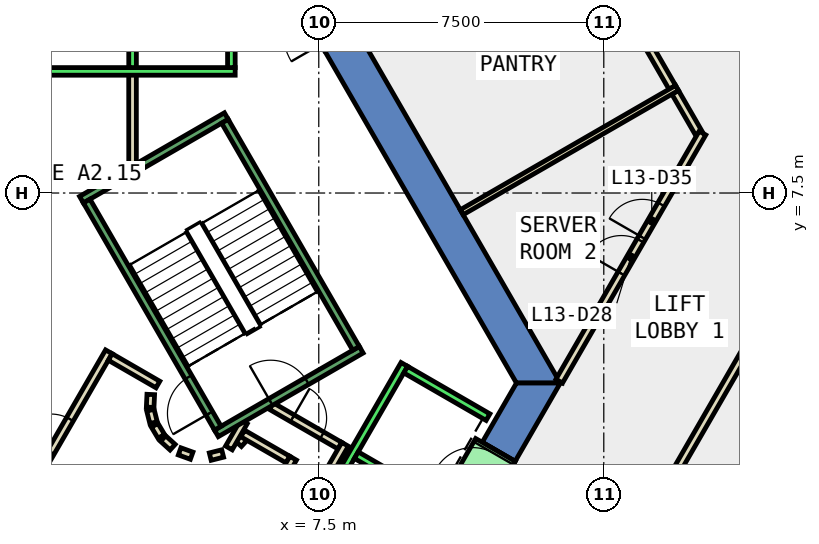
"""IFC4 building model, lengths in metres.
Left out: names, types, materials, properties, quantities, classifications, styles, units other than length and angle.
Written with IfcOpenShell. Run it as: python <this file> out.ifc"""

import sys

from ifc_helpers import new_model, si_unit, direction, frame, frame_2d, origin, place, context, subcontext, project, spatial, polyline, rectangle, outline, extrude, element, fill, save


model = new_model("IFC4")
c1 = context("Model", 3, precision=1e-05, world=origin(), true_north=direction((0.0, 1.0)))
c2 = subcontext(c1, "Body", "Model", "MODEL_VIEW")
j1 = project(units=[si_unit("LENGTHUNIT", "METRE"), si_unit("PLANEANGLEUNIT", "RADIAN")], contexts=[c1])
p1 = place(None, origin())
s1 = spatial("IfcSite", under=j1, at=p1, CompositionType="ELEMENT")
p2 = place(p1, origin())
s2 = spatial("IfcBuilding", under=s1, at=p2, CompositionType="ELEMENT")
p3 = place(p2, frame((0.0, 0.0, 64.4)))
s3 = spatial("IfcBuildingStorey", under=s2, at=p3, CompositionType="ELEMENT", Elevation=64.4)
p4 = place(p3, frame((0.0, 0.0, -0.4)))
e1 = element("IfcWall", 1, at=p4, inside=s3, PredefinedType="SHEAR", context=c2, shape_type="SweptSolid", body=[
    extrude(outline(polyline([(8.517, 11.748), (7.651, 11.248), (12.702, 2.5), (13.856, 2.5), (8.517, 11.748)])), origin(), (0.0, 0.0, 1.0), 4.2),
])
p5 = place(p3, frame((0.0, 0.0, -0.4)))
e2 = element("IfcWall", 2, at=p5, inside=s3, PredefinedType="SHEAR", context=c2, shape_type="SweptSolid", body=[
    extrude(outline(polyline([(11.801, 0.94), (12.667, 0.44), (13.856, 2.5), (12.702, 2.5), (11.801, 0.94)])), origin(), (0.0, 0.0, 1.0), 4.2),
])
p6 = place(p3, frame((0.0, 0.0, 3.6)))
e3 = element("IfcWall", 3, at=p6, inside=s3, PredefinedType="SHEAR", context=c2, shape_type="SweptSolid", body=[
    extrude(outline(polyline([(12.667, 0.44), (11.801, 0.94), (11.151, -0.186), (12.017, -0.686), (12.667, 0.44)])), origin(), (0.0, 0.0, 1.0), 0.2),
])
p7 = place(p3, frame((17.497, 9.078, 0.0), z_axis=(0.0, 0.0, 1.0), x_axis=(-0.500126451326, 0.865952384768, 0.0)))
e4 = element("IfcWall", 4, at=p7, inside=s3, PredefinedType="PARTITIONING", context=c2, shape_type="SweptSolid", body=[
    extrude(rectangle(XDim=1.238, YDim=0.2, at=frame_2d((0.619, 0.0))), origin(), (0.0, 0.0, 1.0), 3.8),
])
p8 = place(p3, frame((16.803, 10.28, 0.0), z_axis=(0.0, 0.0, 1.0), x_axis=(-0.499941881293, 0.866058956036, 0.0)))
e5 = element("IfcWall", 5, at=p8, inside=s3, PredefinedType="PARTITIONING", context=c2, shape_type="SweptSolid", body=[
    extrude(rectangle(XDim=3.114, YDim=0.2, at=frame_2d((1.557, 0.0))), origin(), (0.0, 0.0, 1.0), 3.8),
])
p9 = place(p3, frame((17.318, 14.187, 0.0), z_axis=(0.0, 0.0, 1.0), x_axis=(0.499986381413, -0.866033266336, 0.0)))
e6 = element("IfcWall", 6, at=p9, inside=s3, PredefinedType="PARTITIONING", context=c2, shape_type="SweptSolid", body=[
    extrude(rectangle(XDim=7.18, YDim=0.2, at=frame_2d((3.59, 0.0))), origin(), (0.0, 0.0, 1.0), 3.8),
])
p10 = place(p9, frame((3.165, 0.0, 0.0)))
e7 = element("IfcOpeningElement", 7, at=p10, cuts=e6, PredefinedType="OPENING", context=c2, shape_type="SweptSolid", body=[
    extrude(rectangle(XDim=1.0, YDim=2.1, at=frame_2d((0.5, 1.05))), frame((0.0, 0.11, 0.0), z_axis=(0.0, -1.0, 0.0), x_axis=(1.0, 0.0, 0.0)), (0.0, 0.0, 1.0), 0.22),
])
p11 = place(p3, frame((1.88, 7.8, 0.0), z_axis=(0.0, 0.0, 1.0), x_axis=(-1.0, 0.0, 0.0)))
e8 = element("IfcWall", 8, at=p11, inside=s3, PredefinedType="PARTITIONING", context=c2, shape_type="SweptSolid", body=[
    extrude(rectangle(XDim=1.78, YDim=0.2, at=frame_2d((0.89, 0.0))), origin(), (0.0, 0.0, 1.0), 3.8),
])
p12 = place(p3, frame((2.599, 10.7, 0.0), z_axis=(0.0, 0.0, 1.0), x_axis=(0.000393159002, -0.999999922713, 0.0)))
e9 = element("IfcWall", 9, at=p12, inside=s3, PredefinedType="PARTITIONING", context=c2, shape_type="SweptSolid", body=[
    extrude(rectangle(XDim=2.484, YDim=0.2, at=frame_2d((1.242, 0.0))), origin(), (0.0, 0.0, 1.0), 3.8),
])
p13 = place(p3, frame((5.39, 0.898, 0.0), z_axis=(0.0, 0.0, 1.0), x_axis=(0.673828488714, 0.738887791073, 0.0)))
e10 = element("IfcWall", 10, at=p13, inside=s3, PredefinedType="PARTITIONING", context=c2, shape_type="SweptSolid", body=[
    extrude(rectangle(XDim=0.263, YDim=0.2, at=frame_2d((0.131, 0.0))), origin(), (0.0, 0.0, 1.0), 3.8),
])
p14 = place(p3, frame((5.499, 1.172, 0.0), z_axis=(0.0, 0.0, 1.0), x_axis=(0.866333505267, -0.499465972466, 0.0)))
e11 = element("IfcWall", 11, at=p14, inside=s3, PredefinedType="PARTITIONING", context=c2, shape_type="SweptSolid", body=[
    extrude(rectangle(XDim=1.374, YDim=0.2, at=frame_2d((0.687, 0.0))), origin(), (0.0, 0.0, 1.0), 3.8),
])
p15 = place(p3, frame((6.826, 0.522, 0.0), z_axis=(0.0, 0.0, 1.0), x_axis=(-0.500016722714, -0.866015748706, 0.0)))
e12 = element("IfcWall", 12, at=p15, inside=s3, PredefinedType="PARTITIONING", context=c2, shape_type="SweptSolid", body=[
    extrude(rectangle(XDim=1.7, YDim=0.2, at=frame_2d((0.85, 0.0))), origin(), (0.0, 0.0, 1.0), 3.8),
])
p16 = place(p3, frame((6.25, 1.894, 0.0), z_axis=(0.0, 0.0, 1.0), x_axis=(0.866043184279, -0.499969202016, 0.0)))
e13 = element("IfcWall", 13, at=p16, inside=s3, PredefinedType="PARTITIONING", context=c2, shape_type="SweptSolid", body=[
    extrude(rectangle(XDim=2.084, YDim=0.2, at=frame_2d((1.042, 0.0))), origin(), (0.0, 0.0, 1.0), 3.8),
])
p17 = place(p16, frame((0.642, 0.0, 0.0)))
e14 = element("IfcOpeningElement", 14, at=p17, cuts=e13, PredefinedType="OPENING", context=c2, shape_type="SweptSolid", body=[
    extrude(rectangle(XDim=0.9, YDim=2.1, at=frame_2d((0.45, 1.05))), frame((0.0, 0.11, 0.0), z_axis=(0.0, -1.0, 0.0), x_axis=(1.0, 0.0, 0.0)), (0.0, 0.0, 1.0), 0.22),
])
p18 = place(p3, frame((8.192, 0.888, 0.0), z_axis=(0.0, 0.0, 1.0), x_axis=(-0.499940625693, -0.866059680843, 0.0)))
e15 = element("IfcWall", 15, at=p18, inside=s3, PredefinedType="PARTITIONING", context=c2, shape_type="SweptSolid", body=[
    extrude(rectangle(XDim=2.68, YDim=0.2, at=frame_2d((1.34, 0.0))), origin(), (0.0, 0.0, 1.0), 3.8),
])
p19 = place(p3, frame((5.135, 0.793, 0.0), z_axis=(0.0, 0.0, 1.0), x_axis=(0.499526442893, 0.866298639529, 0.0)))
e16 = element("IfcWall", 16, at=p19, inside=s3, PredefinedType="PARTITIONING", context=c2, shape_type="SweptSolid", body=[
    extrude(rectangle(XDim=0.791, YDim=0.2, at=frame_2d((0.396, 0.0))), origin(), (0.0, 0.0, 1.0), 3.8),
])
p20 = place(p3, frame((11.261, 6.994, 0.0), z_axis=(0.0, 0.0, 1.0), x_axis=(0.866043905515, 0.499967952693, 0.0)))
e17 = element("IfcWall", 17, at=p20, inside=s3, PredefinedType="PARTITIONING", context=c2, shape_type="SweptSolid", body=[
    extrude(rectangle(XDim=6.542, YDim=0.15, at=frame_2d((3.271, 0.0))), origin(), (0.0, 0.0, 1.0), 3.8),
])
p21 = place(p3, frame((13.827, 2.55, 0.0), z_axis=(0.0, 0.0, 1.0), x_axis=(0.500116794417, 0.865957961995, 0.0)))
e18 = element("IfcWall", 18, at=p21, inside=s3, PredefinedType="PARTITIONING", context=c2, shape_type="SweptSolid", body=[
    extrude(rectangle(XDim=7.538, YDim=0.2, at=frame_2d((3.769, 0.0))), origin(), (0.0, 0.0, 1.0), 3.8),
])
p22 = place(p21, frame((3.269, 0.0, 0.0)))
e19 = element("IfcOpeningElement", 19, at=p22, cuts=e18, PredefinedType="OPENING", context=c2, shape_type="SweptSolid", body=[
    extrude(rectangle(XDim=1.0, YDim=2.1, at=frame_2d((0.5, 1.05))), frame((0.0, 0.11, 0.0), z_axis=(0.0, -1.0, 0.0), x_axis=(1.0, 0.0, 0.0)), (0.0, 0.0, 1.0), 0.22),
])
p23 = place(p21, frame((4.369, 0.0, 0.0)))
e20 = element("IfcOpeningElement", 20, at=p23, cuts=e18, PredefinedType="OPENING", context=c2, shape_type="SweptSolid", body=[
    extrude(rectangle(XDim=1.0, YDim=2.1, at=frame_2d((0.5, 1.05))), frame((0.0, 0.11, 0.0), z_axis=(0.0, -1.0, 0.0), x_axis=(1.0, 0.0, 0.0)), (0.0, 0.0, 1.0), 0.22),
])
p24 = place(p3, frame((-0.52, -1.0, 0.0), z_axis=(0.0, 0.0, 1.0), x_axis=(0.50011622646, 0.865958290007, 0.0)))
e21 = element("IfcWall", 21, at=p24, inside=s3, PredefinedType="PARTITIONING", context=c2, shape_type="SweptSolid", body=[
    extrude(rectangle(XDim=4.991, YDim=0.2, at=frame_2d((2.496, 0.0))), origin(), (0.0, 0.0, 1.0), 3.8),
])
p25 = place(p24, frame((1.945, 0.0, 0.0)))
e22 = element("IfcOpeningElement", 22, at=p25, cuts=e21, PredefinedType="OPENING", context=c2, shape_type="SweptSolid", body=[
    extrude(rectangle(XDim=1.0, YDim=2.1, at=frame_2d((0.5, 1.05))), frame((0.0, 0.11, 0.0), z_axis=(0.0, -1.0, 0.0), x_axis=(1.0, 0.0, 0.0)), (0.0, 0.0, 1.0), 0.22),
])
p26 = place(p3, frame((2.012, 3.186, 0.0), z_axis=(0.0, 0.0, 1.0), x_axis=(0.865891012941, -0.500232699559, 0.0)))
e23 = element("IfcWall", 23, at=p26, inside=s3, PredefinedType="PARTITIONING", context=c2, shape_type="SweptSolid", body=[
    extrude(rectangle(XDim=1.449, YDim=0.2, at=frame_2d((0.725, 0.0))), origin(), (0.0, 0.0, 1.0), 3.8),
])
p27 = place(p3, frame((3.079, 2.199, 0.0), z_axis=(0.0, 0.0, 1.0), x_axis=(-0.047771483479, -0.998858290933, 0.0)))
e24 = element("IfcWall", 24, at=p27, inside=s3, PredefinedType="PARTITIONING", context=c2, shape_type="SweptSolid", body=[
    extrude(rectangle(XDim=0.337, YDim=0.2, at=frame_2d((0.169, 0.0))), origin(), (0.0, 0.0, 1.0), 3.8),
])
p28 = place(p3, frame((3.07, 1.786, 0.0), z_axis=(0.0, 0.0, 1.0), x_axis=(0.242705583207, -0.970099994784, 0.0)))
e25 = element("IfcWall", 25, at=p28, inside=s3, PredefinedType="PARTITIONING", context=c2, shape_type="SweptSolid", body=[
    extrude(rectangle(XDim=0.338, YDim=0.2, at=frame_2d((0.169, 0.0))), origin(), (0.0, 0.0, 1.0), 3.8),
])
for number, where, z_axis, x_axis in (
    (26, (3.182, 1.388, 0.0), (0.0, 0.0, 1.0), (0.512, -0.859, 0.0)),
    (27, (3.404, 1.039, 0.0), (0.0, 0.0, 1.0), (0.74, -0.672, 0.0)),
):
    element("IfcWall", number, at=place(p3, frame(where, z_axis=z_axis, x_axis=x_axis)), inside=s3, PredefinedType="PARTITIONING", context=c2, shape_type="SweptSolid", body=[
        extrude(rectangle(XDim=0.338, YDim=0.2, at=frame_2d((0.169, 0.0))), origin(), (0.0, 0.0, 1.0), 3.8),
    ])
p29 = place(p3, frame((3.838, 0.702, 0.0), z_axis=(0.0, 0.0, 1.0), x_axis=(0.941035081519, -0.338308993895, 0.0)))
e28 = element("IfcWall", 28, at=p29, inside=s3, PredefinedType="PARTITIONING", context=c2, shape_type="SweptSolid", body=[
    extrude(rectangle(XDim=0.337, YDim=0.2, at=frame_2d((0.168, 0.0))), origin(), (0.0, 0.0, 1.0), 3.8),
])
p30 = place(p3, frame((4.644, 0.564, 0.0), z_axis=(0.0, 0.0, 1.0), x_axis=(0.969929076366, 0.243387729394, 0.0)))
e29 = element("IfcWall", 29, at=p30, inside=s3, PredefinedType="PARTITIONING", context=c2, shape_type="SweptSolid", body=[
    extrude(rectangle(XDim=0.337, YDim=0.2, at=frame_2d((0.168, 0.0))), origin(), (0.0, 0.0, 1.0), 3.8),
])
p31 = place(p3, frame((19.81, 5.211, 0.0), z_axis=(0.0, 0.0, 1.0), x_axis=(-0.500003368273, -0.866023459102, 0.0)))
e30 = element("IfcWall", 30, at=p31, inside=s3, PredefinedType="PARTITIONING", context=c2, shape_type="SweptSolid", body=[
    extrude(rectangle(XDim=14.018, YDim=0.2, at=frame_2d((7.009, 0.0))), origin(), (0.0, 0.0, 1.0), 3.8),
])
p32 = place(p3, frame((5.3, 10.7, 0.0), z_axis=(0.0, 0.0, 1.0), x_axis=(-1.0, 0.0, 0.0)))
e31 = element("IfcWall", 31, at=p32, inside=s3, PredefinedType="STANDARD", context=c2, shape_type="SweptSolid", body=[
    extrude(rectangle(XDim=10.6, YDim=0.2, at=frame_2d((5.3, 0.0))), origin(), (0.0, 0.0, 1.0), 3.8),
])
for number, where, z_axis, x_axis in (
    (32, (5.2, 10.8, 0.0), (0.0, 0.0, 1.0), (0.0, 1.0, 0.0)),
    (33, (2.6, 10.8, 0.0), (0.0, 0.0, 1.0), (0.0, 1.0, 0.0)),
):
    element("IfcWall", number, at=place(p3, frame(where, z_axis=z_axis, x_axis=x_axis)), inside=s3, PredefinedType="STANDARD", context=c2, shape_type="SweptSolid", body=[
        extrude(rectangle(XDim=2.5, YDim=0.2, at=frame_2d((1.25, 0.0))), origin(), (0.0, 0.0, 1.0), 3.8),
    ])
p33 = place(p3, frame((4.451, -6.19, 0.0), z_axis=(0.0, 0.0, 1.0), x_axis=(0.50000090737, 0.866024879913, 0.0)))
e34 = element("IfcWall", 34, at=p33, inside=s3, PredefinedType="STANDARD", context=c2, shape_type="SweptSolid", body=[
    extrude(rectangle(XDim=10.6, YDim=0.2, at=frame_2d((5.3, 0.0))), origin(), (0.0, 0.0, 1.0), 3.8),
])
p34 = place(p3, frame((8.488, 0.602, 0.0), z_axis=(0.0, 0.0, 1.0), x_axis=(0.866022959057, -0.500004234368, 0.0)))
e35 = element("IfcWall", 35, at=p34, inside=s3, PredefinedType="STANDARD", context=c2, shape_type="SweptSolid", body=[
    extrude(rectangle(XDim=2.5, YDim=0.2, at=frame_2d((1.25, 0.0))), origin(), (0.0, 0.0, 1.0), 3.8),
])
p35 = place(p3, frame((9.788, 2.853, 0.0), z_axis=(0.0, 0.0, 1.0), x_axis=(0.865998541277, -0.500046524342, 0.0)))
e36 = element("IfcWall", 36, at=p35, inside=s3, PredefinedType="STANDARD", context=c2, shape_type="SweptSolid", body=[
    extrude(rectangle(XDim=2.5, YDim=0.2, at=frame_2d((1.25, 0.0))), origin(), (0.0, 0.0, 1.0), 3.8),
])
p36 = place(p3, frame((11.498, -0.385, 0.0), z_axis=(0.0, 0.0, 1.0), x_axis=(0.500221244143, 0.865897630733, 0.0)))
e37 = element("IfcWall", 37, at=p36, inside=s3, PredefinedType="STANDARD", context=c2, shape_type="SweptSolid", body=[
    extrude(rectangle(XDim=1.299, YDim=1.2, at=frame_2d((0.65, 0.0))), origin(), (0.0, 0.0, 1.0), 2.4),
])
p37 = place(p36, frame((0.1, 0.0, 0.0)))
e38 = element("IfcOpeningElement", 38, at=p37, cuts=e37, PredefinedType="OPENING", context=c2, shape_type="SweptSolid", body=[
    extrude(rectangle(XDim=1.1, YDim=2.3, at=frame_2d((0.55, 1.15))), frame((0.0, 0.61, 0.0), z_axis=(0.0, -1.0, 0.0), x_axis=(1.0, 0.0, 0.0)), (0.0, 0.0, 1.0), 1.22),
])
p38 = place(p3, frame((4.806, 1.176, 0.0), z_axis=(0.0, 0.0, 1.0), x_axis=(0.866059941101, 0.499940174841, 0.0)))
e39 = element("IfcWall", 39, at=p38, inside=s3, PredefinedType="STANDARD", context=c2, shape_type="SweptSolid", body=[
    extrude(rectangle(XDim=4.4, YDim=0.2, at=frame_2d((2.2, 0.0))), origin(), (0.0, 0.0, 1.0), 3.8),
])
p39 = place(p38, frame((1.65, 0.0, 0.0)))
e40 = element("IfcOpeningElement", 40, at=p39, cuts=e39, PredefinedType="OPENING", context=c2, shape_type="SweptSolid", body=[
    extrude(rectangle(XDim=1.1, YDim=2.2, at=frame_2d((0.55, 1.1))), frame((0.0, 0.11, 0.0), z_axis=(0.0, -1.0, 0.0), x_axis=(1.0, 0.0, 0.0)), (0.0, 0.0, 1.0), 0.22),
])
p40 = place(p3, frame((1.256, 7.324, 0.0), z_axis=(0.0, 0.0, 1.0), x_axis=(0.866046073146, 0.499964197906, 0.0)))
e41 = element("IfcWall", 41, at=p40, inside=s3, PredefinedType="STANDARD", context=c2, shape_type="SweptSolid", body=[
    extrude(rectangle(XDim=4.4, YDim=0.2, at=frame_2d((2.2, 0.0))), origin(), (0.0, 0.0, 1.0), 3.8),
])
p41 = place(p3, frame((4.843, 1.312, 0.0), z_axis=(0.0, 0.0, 1.0), x_axis=(-0.499963383562, 0.866046543262, 0.0)))
e42 = element("IfcWall", 42, at=p41, inside=s3, PredefinedType="STANDARD", context=c2, shape_type="SweptSolid", body=[
    extrude(rectangle(XDim=6.9, YDim=0.2, at=frame_2d((3.45, 0.0))), origin(), (0.0, 0.0, 1.0), 3.8),
])
p42 = place(p41, frame((0.45, 0.0, 0.0)))
e43 = element("IfcOpeningElement", 43, at=p42, cuts=e42, PredefinedType="OPENING", context=c2, shape_type="SweptSolid", body=[
    extrude(rectangle(XDim=1.1, YDim=2.2, at=frame_2d((0.55, 1.1))), frame((0.0, 0.11, 0.0), z_axis=(0.0, -1.0, 0.0), x_axis=(1.0, 0.0, 0.0)), (0.0, 0.0, 1.0), 0.22),
])
p43 = place(p3, frame((8.48, 3.412, 0.0), z_axis=(0.0, 0.0, 1.0), x_axis=(-0.499978703459, 0.866037698999, 0.0)))
e44 = element("IfcWall", 44, at=p43, inside=s3, PredefinedType="STANDARD", context=c2, shape_type="SweptSolid", body=[
    extrude(rectangle(XDim=6.9, YDim=0.2, at=frame_2d((3.45, 0.0))), origin(), (0.0, 0.0, 1.0), 3.8),
])
p44 = place(p22, origin())
e45 = element("IfcDoor", 45, at=p44, inside=s3, OperationType="SINGLE_SWING_LEFT", PredefinedType="DOOR", context=c2, shape_type="SweptSolid", body=[
    extrude(rectangle(XDim=1.0, YDim=2.1, at=frame_2d((0.5, 1.05))), frame((0.0, 0.025, 0.0), z_axis=(0.0, -1.0, 0.0), x_axis=(1.0, 0.0, 0.0)), (0.0, 0.0, 1.0), 0.05),
])
fill(e19, e45)
p45 = place(p25, origin())
e46 = element("IfcDoor", 46, at=p45, inside=s3, OperationType="SINGLE_SWING_LEFT", PredefinedType="DOOR", context=c2, shape_type="SweptSolid", body=[
    extrude(rectangle(XDim=1.0, YDim=2.1, at=frame_2d((0.5, 1.05))), frame((0.0, 0.025, 0.0), z_axis=(0.0, -1.0, 0.0), x_axis=(1.0, 0.0, 0.0)), (0.0, 0.0, 1.0), 0.05),
])
fill(e22, e46)
p46 = place(p17, origin())
e47 = element("IfcDoor", 47, at=p46, inside=s3, OperationType="SINGLE_SWING_LEFT", PredefinedType="DOOR", context=c2, shape_type="SweptSolid", body=[
    extrude(rectangle(XDim=0.9, YDim=2.1, at=frame_2d((0.45, 1.05))), frame((0.0, 0.025, 0.0), z_axis=(0.0, -1.0, 0.0), x_axis=(1.0, 0.0, 0.0)), (0.0, 0.0, 1.0), 0.05),
])
fill(e14, e47)
p47 = place(p23, origin())
e48 = element("IfcDoor", 48, at=p47, inside=s3, OperationType="SINGLE_SWING_RIGHT", PredefinedType="DOOR", context=c2, shape_type="SweptSolid", body=[
    extrude(rectangle(XDim=1.0, YDim=2.1, at=frame_2d((0.5, 1.05))), frame((0.0, 0.025, 0.0), z_axis=(0.0, -1.0, 0.0), x_axis=(1.0, 0.0, 0.0)), (0.0, 0.0, 1.0), 0.05),
])
fill(e20, e48)
p48 = place(p37, origin())
e49 = element("IfcDoor", 49, at=p48, inside=s3, OperationType="SLIDING_TO_LEFT", PredefinedType="DOOR", context=c2, shape_type="SweptSolid", body=[
    extrude(rectangle(XDim=1.1, YDim=2.3, at=frame_2d((0.55, 1.15))), frame((0.0, 0.025, 0.0), z_axis=(0.0, -1.0, 0.0), x_axis=(1.0, 0.0, 0.0)), (0.0, 0.0, 1.0), 0.05),
])
fill(e38, e49)
p49 = place(p42, origin())
e50 = element("IfcDoor", 50, at=p49, inside=s3, OperationType="SINGLE_SWING_LEFT", PredefinedType="DOOR", context=c2, shape_type="SweptSolid", body=[
    extrude(rectangle(XDim=1.1, YDim=2.2, at=frame_2d((0.55, 1.1))), frame((0.0, 0.025, 0.0), z_axis=(0.0, -1.0, 0.0), x_axis=(1.0, 0.0, 0.0)), (0.0, 0.0, 1.0), 0.05),
])
fill(e43, e50)
p50 = place(p39, origin())
e51 = element("IfcDoor", 51, at=p50, inside=s3, OperationType="SINGLE_SWING_LEFT", PredefinedType="DOOR", context=c2, shape_type="SweptSolid", body=[
    extrude(rectangle(XDim=1.1, YDim=2.2, at=frame_2d((0.55, 1.1))), frame((0.0, 0.025, 0.0), z_axis=(0.0, -1.0, 0.0), x_axis=(1.0, 0.0, 0.0)), (0.0, 0.0, 1.0), 0.05),
])
fill(e40, e51)
save(model, sys.argv[1])
